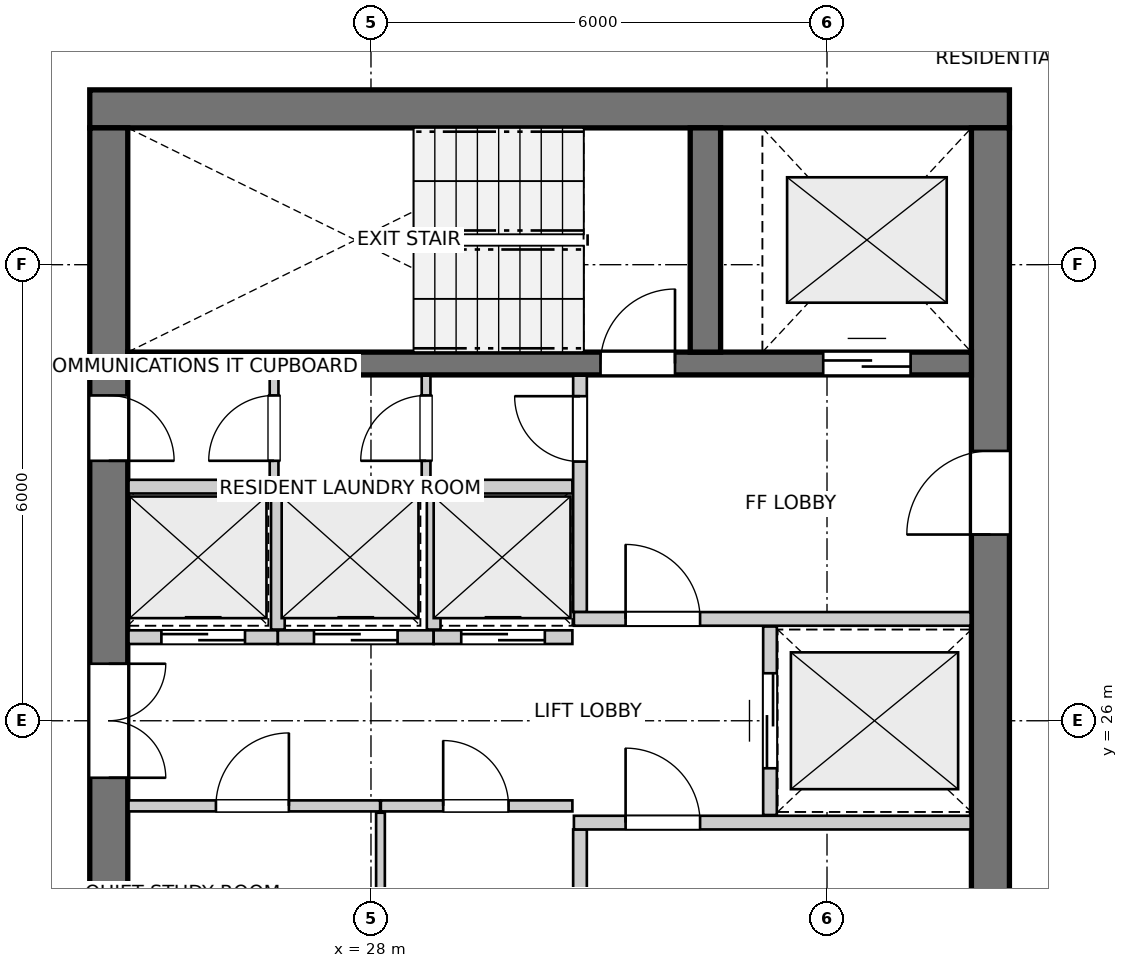
"""IFC4 building model, lengths in metres.
Left out: names, types, materials, properties, quantities, classifications, styles, units other than length and angle.
Written with IfcOpenShell. Run it as: python <this file> out.ifc"""

import sys

from ifc_helpers import new_model, si_unit, direction, frame, frame_2d, origin, place, context, subcontext, project, spatial, rectangle, extrude, source, transform, mapped, element, fill, save


model = new_model("IFC4")
c1 = context("Model", 3, precision=1e-05, world=origin(), true_north=direction((0.0, 1.0)))
c2 = subcontext(c1, "Body", "Model", "MODEL_VIEW")
j1 = project(units=[si_unit("LENGTHUNIT", "METRE"), si_unit("PLANEANGLEUNIT", "RADIAN")], contexts=[c1])
p1 = place(None, origin())
s1 = spatial("IfcSite", under=j1, at=p1, CompositionType="ELEMENT")
p2 = place(p1, origin())
s2 = spatial("IfcBuilding", under=s1, at=p2, CompositionType="ELEMENT")
p3 = place(p2, frame((0.0, 0.0, 243.6)))
s3 = spatial("IfcBuildingStorey", under=s2, at=p3, CompositionType="ELEMENT", Elevation=243.6)
p4 = place(p3, frame((36.4, 34.05, 0.0), z_axis=(0.0, 0.0, 1.0), x_axis=(-1.0, 0.0, 0.0)))
e1 = element("IfcWall", 1, at=p4, inside=s3, PredefinedType="SHEAR", context=c2, shape_type="SweptSolid", body=[
    extrude(rectangle(XDim=12.1, YDim=0.5, at=frame_2d((6.05, 0.0))), origin(), (0.0, 0.0, 1.0), 2.96),
])
p5 = place(p3, frame((24.55, 33.8, 0.0), z_axis=(0.0, 0.0, 1.0), x_axis=(0.0, -1.0, 0.0)))
e2 = element("IfcWall", 2, at=p5, inside=s3, PredefinedType="SHEAR", context=c2, shape_type="SweptSolid", body=[
    extrude(rectangle(XDim=15.6, YDim=0.5, at=frame_2d((7.8, 0.0))), origin(), (0.0, 0.0, 1.0), 2.96),
])
p6 = place(p5, frame((7.05, 0.0, 0.0)))
e3 = element("IfcOpeningElement", 3, at=p6, cuts=e2, PredefinedType="OPENING", context=c2, shape_type="SweptSolid", body=[
    extrude(rectangle(XDim=1.5, YDim=2.15, at=frame_2d((0.75, 1.075))), frame((0.0, 0.26, 0.0), z_axis=(0.0, -1.0, 0.0), x_axis=(1.0, 0.0, 0.0)), (0.0, 0.0, 1.0), 0.52),
])
p7 = place(p5, frame((3.52, 0.0, 0.0)))
e4 = element("IfcOpeningElement", 4, at=p7, cuts=e2, PredefinedType="OPENING", context=c2, shape_type="SweptSolid", body=[
    extrude(rectangle(XDim=0.86, YDim=2.05, at=frame_2d((0.43, 1.025))), frame((0.0, 0.26, 0.0), z_axis=(0.0, -1.0, 0.0), x_axis=(1.0, 0.0, 0.0)), (0.0, 0.0, 1.0), 0.52),
])
p8 = place(p5, frame((11.22, 0.0, 0.0)))
e5 = element("IfcOpeningElement", 5, at=p8, cuts=e2, PredefinedType="OPENING", context=c2, shape_type="SweptSolid", body=[
    extrude(rectangle(XDim=0.86, YDim=2.05, at=frame_2d((0.43, 1.025))), frame((0.0, 0.26, 0.0), z_axis=(0.0, -1.0, 0.0), x_axis=(1.0, 0.0, 0.0)), (0.0, 0.0, 1.0), 0.52),
])
p9 = place(p3, frame((36.15, 18.2, 0.0), z_axis=(0.0, 0.0, 1.0), x_axis=(0.0, 1.0, 0.0)))
e6 = element("IfcWall", 6, at=p9, inside=s3, PredefinedType="SHEAR", context=c2, shape_type="SweptSolid", body=[
    extrude(rectangle(XDim=15.6, YDim=0.5, at=frame_2d((7.8, 0.0))), origin(), (0.0, 0.0, 1.0), 2.96),
])
p10 = place(p9, frame((4.25, 0.0, 0.0)))
e7 = element("IfcOpeningElement", 7, at=p10, cuts=e6, PredefinedType="OPENING", context=c2, shape_type="SweptSolid", body=[
    extrude(rectangle(XDim=1.1, YDim=2.15, at=frame_2d((0.55, 1.075))), frame((0.0, 0.26, 0.0), z_axis=(0.0, -1.0, 0.0), x_axis=(1.0, 0.0, 0.0)), (0.0, 0.0, 1.0), 0.52),
])
p11 = place(p9, frame((10.25, 0.0, 0.0)))
e8 = element("IfcOpeningElement", 8, at=p11, cuts=e6, PredefinedType="OPENING", context=c2, shape_type="SweptSolid", body=[
    extrude(rectangle(XDim=1.1, YDim=2.15, at=frame_2d((0.55, 1.075))), frame((0.0, 0.26, 0.0), z_axis=(0.0, -1.0, 0.0), x_axis=(1.0, 0.0, 0.0)), (0.0, 0.0, 1.0), 0.52),
])
p12 = place(p3, frame((24.8, 30.7, 0.0), z_axis=(0.0, 0.0, 1.0), x_axis=(1.0, 0.0, 0.0)))
e9 = element("IfcWall", 9, at=p12, inside=s3, PredefinedType="SHEAR", context=c2, shape_type="SweptSolid", body=[
    extrude(rectangle(XDim=11.1, YDim=0.3, at=frame_2d((5.55, 0.0))), origin(), (0.0, 0.0, 1.0), 2.96),
])
p13 = place(p12, frame((6.22, 0.0, 0.0)))
e10 = element("IfcOpeningElement", 10, at=p13, cuts=e9, PredefinedType="OPENING", context=c2, shape_type="SweptSolid", body=[
    extrude(rectangle(XDim=0.98, YDim=2.15, at=frame_2d((0.49, 1.075))), frame((0.0, 0.16, 0.0), z_axis=(0.0, -1.0, 0.0), x_axis=(1.0, 0.0, 0.0)), (0.0, 0.0, 1.0), 0.32),
])
p14 = place(p12, frame((9.15, 0.0, 0.0)))
e11 = element("IfcOpeningElement", 11, at=p14, cuts=e9, PredefinedType="OPENING", context=c2, shape_type="SweptSolid", body=[
    extrude(rectangle(XDim=1.15, YDim=2.15, at=frame_2d((0.575, 1.075))), frame((0.0, 0.16, 0.0), z_axis=(0.0, -1.0, 0.0), x_axis=(1.0, 0.0, 0.0)), (0.0, 0.0, 1.0), 0.32),
])
p15 = place(p3, frame((32.4, 30.85, 0.0), z_axis=(0.0, 0.0, 1.0), x_axis=(0.0, 1.0, 0.0)))
e12 = element("IfcWall", 12, at=p15, inside=s3, PredefinedType="SHEAR", context=c2, shape_type="SweptSolid", body=[
    extrude(rectangle(XDim=2.95, YDim=0.4, at=frame_2d((1.475, 0.0))), origin(), (0.0, 0.0, 1.0), 2.96),
])
p16 = place(p3, frame((30.75, 21.46, 0.0), z_axis=(0.0, 0.0, 1.0), x_axis=(0.0, 1.0, 0.0)))
e13 = element("IfcWall", 13, at=p16, inside=s3, PredefinedType="PARTITIONING", context=c2, shape_type="SweptSolid", body=[
    extrude(rectangle(XDim=3.11, YDim=0.18, at=frame_2d((1.555, 0.0))), origin(), (0.0, 0.0, 1.0), 2.96),
])
p17 = place(p16, frame((0.26, 0.0, 0.0)))
e14 = element("IfcOpeningElement", 14, at=p17, cuts=e13, PredefinedType="OPENING", context=c2, shape_type="SweptSolid", body=[
    extrude(rectangle(XDim=0.86, YDim=2.05, at=frame_2d((0.43, 1.025))), frame((0.0, 0.1, 0.0), z_axis=(0.0, -1.0, 0.0), x_axis=(1.0, 0.0, 0.0)), (0.0, 0.0, 1.0), 0.2),
])
p18 = place(p3, frame((30.67, 24.66, 0.0), z_axis=(0.0, 0.0, 1.0), x_axis=(1.0, 0.0, 0.0)))
e15 = element("IfcWall", 15, at=p18, inside=s3, PredefinedType="PARTITIONING", context=c2, shape_type="SweptSolid", body=[
    extrude(rectangle(XDim=5.22, YDim=0.18, at=frame_2d((2.61, 0.0))), origin(), (0.0, 0.0, 1.0), 2.96),
])
p19 = place(p18, frame((0.68, 0.0, 0.0)))
e16 = element("IfcOpeningElement", 16, at=p19, cuts=e15, PredefinedType="OPENING", context=c2, shape_type="SweptSolid", body=[
    extrude(rectangle(XDim=0.98, YDim=2.15, at=frame_2d((0.49, 1.075))), frame((0.0, 0.1, 0.0), z_axis=(0.0, -1.0, 0.0), x_axis=(1.0, 0.0, 0.0)), (0.0, 0.0, 1.0), 0.2),
])
p20 = place(p3, frame((30.75, 27.43, 0.0), z_axis=(0.0, 0.0, 1.0), x_axis=(0.0, 1.0, 0.0)))
e17 = element("IfcWall", 17, at=p20, inside=s3, PredefinedType="PARTITIONING", context=c2, shape_type="SweptSolid", body=[
    extrude(rectangle(XDim=3.11, YDim=0.18, at=frame_2d((1.555, 0.0))), origin(), (0.0, 0.0, 1.0), 2.96),
])
p21 = place(p20, frame((1.98, 0.0, 0.0)))
e18 = element("IfcOpeningElement", 18, at=p21, cuts=e17, PredefinedType="OPENING", context=c2, shape_type="SweptSolid", body=[
    extrude(rectangle(XDim=0.86, YDim=2.05, at=frame_2d((0.43, 1.025))), frame((0.0, 0.1, 0.0), z_axis=(0.0, -1.0, 0.0), x_axis=(1.0, 0.0, 0.0)), (0.0, 0.0, 1.0), 0.2),
])
p22 = place(p3, frame((30.67, 27.34, 0.0), z_axis=(0.0, 0.0, 1.0), x_axis=(1.0, 0.0, 0.0)))
e19 = element("IfcWall", 19, at=p22, inside=s3, PredefinedType="PARTITIONING", context=c2, shape_type="SweptSolid", body=[
    extrude(rectangle(XDim=5.22, YDim=0.18, at=frame_2d((2.61, 0.0))), origin(), (0.0, 0.0, 1.0), 2.96),
])
p23 = place(p22, frame((0.68, 0.0, 0.0)))
e20 = element("IfcOpeningElement", 20, at=p23, cuts=e19, PredefinedType="OPENING", context=c2, shape_type="SweptSolid", body=[
    extrude(rectangle(XDim=0.98, YDim=2.15, at=frame_2d((0.49, 1.075))), frame((0.0, 0.1, 0.0), z_axis=(0.0, -1.0, 0.0), x_axis=(1.0, 0.0, 0.0)), (0.0, 0.0, 1.0), 0.2),
])
p24 = place(p3, frame((33.25, 24.76, 0.0), z_axis=(0.0, 0.0, 1.0), x_axis=(0.0, 1.0, 0.0)))
e21 = element("IfcWall", 21, at=p24, inside=s3, PredefinedType="PARTITIONING", context=c2, shape_type="SweptSolid", body=[
    extrude(rectangle(XDim=2.48, YDim=0.18, at=frame_2d((1.24, 0.0))), origin(), (0.0, 0.0, 1.0), 2.96),
])
p25 = place(p24, frame((0.615, 0.0, 0.0)))
e22 = element("IfcOpeningElement", 22, at=p25, cuts=e21, PredefinedType="OPENING", context=c2, shape_type="SweptSolid", body=[
    extrude(rectangle(XDim=1.25, YDim=2.15, at=frame_2d((0.625, 1.075))), frame((0.0, 0.1, 0.0), z_axis=(0.0, -1.0, 0.0), x_axis=(1.0, 0.0, 0.0)), (0.0, 0.0, 1.0), 0.2),
])
p26 = place(p3, frame((24.81, 24.88, 0.0), z_axis=(0.0, 0.0, 1.0), x_axis=(1.0, 0.0, 0.0)))
e23 = element("IfcWall", 23, at=p26, inside=s3, PredefinedType="PARTITIONING", context=c2, shape_type="SweptSolid", body=[
    extrude(rectangle(XDim=3.31, YDim=0.145, at=frame_2d((1.655, 0.0))), origin(), (0.0, 0.0, 1.0), 2.96),
])
p27 = place(p26, frame((1.15, 0.0, 0.0)))
e24 = element("IfcOpeningElement", 24, at=p27, cuts=e23, PredefinedType="OPENING", context=c2, shape_type="SweptSolid", body=[
    extrude(rectangle(XDim=0.96, YDim=2.1, at=frame_2d((0.48, 1.05))), frame((0.0, 0.083, 0.0), z_axis=(0.0, -1.0, 0.0), x_axis=(1.0, 0.0, 0.0)), (0.0, 0.0, 1.0), 0.165),
])
p28 = place(p3, frame((28.13, 24.88, 0.0), z_axis=(0.0, 0.0, 1.0), x_axis=(1.0, 0.0, 0.0)))
e25 = element("IfcWall", 25, at=p28, inside=s3, PredefinedType="PARTITIONING", context=c2, shape_type="SweptSolid", body=[
    extrude(rectangle(XDim=2.52, YDim=0.145, at=frame_2d((1.26, 0.0))), origin(), (0.0, 0.0, 1.0), 2.96),
])
p29 = place(p28, frame((0.82, 0.0, 0.0)))
e26 = element("IfcOpeningElement", 26, at=p29, cuts=e25, PredefinedType="OPENING", context=c2, shape_type="SweptSolid", body=[
    extrude(rectangle(XDim=0.86, YDim=2.05, at=frame_2d((0.43, 1.025))), frame((0.0, 0.083, 0.0), z_axis=(0.0, -1.0, 0.0), x_axis=(1.0, 0.0, 0.0)), (0.0, 0.0, 1.0), 0.165),
])
p30 = place(p3, frame((28.125, 23.02, 0.0), z_axis=(0.0, 0.0, 1.0), x_axis=(0.0, 1.0, 0.0)))
e27 = element("IfcWall", 27, at=p30, inside=s3, PredefinedType="PARTITIONING", context=c2, shape_type="SweptSolid", body=[
    extrude(rectangle(XDim=1.77, YDim=0.115, at=frame_2d((0.885, 0.0))), origin(), (0.0, 0.0, 1.0), 2.96),
])
p31 = place(p3, frame((24.81, 29.08, 0.0), z_axis=(0.0, 0.0, 1.0), x_axis=(1.0, 0.0, 0.0)))
e28 = element("IfcWall", 28, at=p31, inside=s3, PredefinedType="PARTITIONING", context=c2, shape_type="SweptSolid", body=[
    extrude(rectangle(XDim=5.84, YDim=0.18, at=frame_2d((2.92, 0.0))), origin(), (0.0, 0.0, 1.0), 2.96),
])
p32 = place(p3, frame((24.81, 27.1, 0.0), z_axis=(0.0, 0.0, 1.0), x_axis=(1.0, 0.0, 0.0)))
e29 = element("IfcWall", 29, at=p32, inside=s3, PredefinedType="PARTITIONING", context=c2, shape_type="SweptSolid", body=[
    extrude(rectangle(XDim=1.965, YDim=0.18, at=frame_2d((0.982, 0.0))), origin(), (0.0, 0.0, 1.0), 2.96),
])
p33 = place(p32, frame((0.433, 0.0, 0.0)))
e30 = element("IfcOpeningElement", 30, at=p33, cuts=e29, PredefinedType="OPENING", context=c2, shape_type="SweptSolid", body=[
    extrude(rectangle(XDim=1.1, YDim=2.15, at=frame_2d((0.55, 1.075))), frame((0.0, 0.1, 0.0), z_axis=(0.0, -1.0, 0.0), x_axis=(1.0, 0.0, 0.0)), (0.0, 0.0, 1.0), 0.2),
])
p34 = place(p3, frame((26.775, 27.1, 0.0), z_axis=(0.0, 0.0, 1.0), x_axis=(1.0, 0.0, 0.0)))
e31 = element("IfcWall", 31, at=p34, inside=s3, PredefinedType="PARTITIONING", context=c2, shape_type="SweptSolid", body=[
    extrude(rectangle(XDim=2.05, YDim=0.18, at=frame_2d((1.025, 0.0))), origin(), (0.0, 0.0, 1.0), 2.96),
])
p35 = place(p34, frame((0.475, 0.0, 0.0)))
e32 = element("IfcOpeningElement", 32, at=p35, cuts=e31, PredefinedType="OPENING", context=c2, shape_type="SweptSolid", body=[
    extrude(rectangle(XDim=1.1, YDim=2.15, at=frame_2d((0.55, 1.075))), frame((0.0, 0.1, 0.0), z_axis=(0.0, -1.0, 0.0), x_axis=(1.0, 0.0, 0.0)), (0.0, 0.0, 1.0), 0.2),
])
p36 = place(p3, frame((26.775, 27.2, 0.0), z_axis=(0.0, 0.0, 1.0), x_axis=(0.0, 1.0, 0.0)))
e33 = element("IfcWall", 33, at=p36, inside=s3, PredefinedType="PARTITIONING", context=c2, shape_type="SweptSolid", body=[
    extrude(rectangle(XDim=1.78, YDim=0.18, at=frame_2d((0.89, 0.0))), origin(), (0.0, 0.0, 1.0), 2.96),
])
p37 = place(p3, frame((28.825, 27.1, 0.0), z_axis=(0.0, 0.0, 1.0), x_axis=(1.0, 0.0, 0.0)))
e34 = element("IfcWall", 34, at=p37, inside=s3, PredefinedType="PARTITIONING", context=c2, shape_type="SweptSolid", body=[
    extrude(rectangle(XDim=1.825, YDim=0.18, at=frame_2d((0.913, 0.0))), origin(), (0.0, 0.0, 1.0), 2.96),
])
p38 = place(p37, frame((0.363, 0.0, 0.0)))
e35 = element("IfcOpeningElement", 35, at=p38, cuts=e34, PredefinedType="OPENING", context=c2, shape_type="SweptSolid", body=[
    extrude(rectangle(XDim=1.1, YDim=2.15, at=frame_2d((0.55, 1.075))), frame((0.0, 0.1, 0.0), z_axis=(0.0, -1.0, 0.0), x_axis=(1.0, 0.0, 0.0)), (0.0, 0.0, 1.0), 0.2),
])
p39 = place(p3, frame((28.825, 27.2, 0.0), z_axis=(0.0, 0.0, 1.0), x_axis=(0.0, 1.0, 0.0)))
e36 = element("IfcWall", 36, at=p39, inside=s3, PredefinedType="PARTITIONING", context=c2, shape_type="SweptSolid", body=[
    extrude(rectangle(XDim=1.78, YDim=0.18, at=frame_2d((0.89, 0.0))), origin(), (0.0, 0.0, 1.0), 2.96),
])
p40 = place(p3, frame((26.725, 29.16, 0.0), z_axis=(0.0, 0.0, 1.0), x_axis=(0.0, 1.0, 0.0)))
e37 = element("IfcWall", 37, at=p40, inside=s3, PredefinedType="PARTITIONING", context=c2, shape_type="SweptSolid", body=[
    extrude(rectangle(XDim=1.38, YDim=0.115, at=frame_2d((0.69, 0.0))), origin(), (0.0, 0.0, 1.0), 2.96),
])
p41 = place(p40, frame((0.26, 0.0, 0.0)))
e38 = element("IfcOpeningElement", 38, at=p41, cuts=e37, PredefinedType="OPENING", context=c2, shape_type="SweptSolid", body=[
    extrude(rectangle(XDim=0.86, YDim=2.05, at=frame_2d((0.43, 1.025))), frame((0.0, 0.067, 0.0), z_axis=(0.0, -1.0, 0.0), x_axis=(1.0, 0.0, 0.0)), (0.0, 0.0, 1.0), 0.135),
])
p42 = place(p3, frame((28.725, 29.16, 0.0), z_axis=(0.0, 0.0, 1.0), x_axis=(0.0, 1.0, 0.0)))
e39 = element("IfcWall", 39, at=p42, inside=s3, PredefinedType="PARTITIONING", context=c2, shape_type="SweptSolid", body=[
    extrude(rectangle(XDim=1.38, YDim=0.115, at=frame_2d((0.69, 0.0))), origin(), (0.0, 0.0, 1.0), 2.96),
])
p43 = place(p42, frame((0.26, 0.0, 0.0)))
e40 = element("IfcOpeningElement", 40, at=p43, cuts=e39, PredefinedType="OPENING", context=c2, shape_type="SweptSolid", body=[
    extrude(rectangle(XDim=0.86, YDim=2.05, at=frame_2d((0.43, 1.025))), frame((0.0, 0.067, 0.0), z_axis=(0.0, -1.0, 0.0), x_axis=(1.0, 0.0, 0.0)), (0.0, 0.0, 1.0), 0.135),
])
m1 = source(origin(), c2, "Body", "SweptSolid", [
    extrude(rectangle(XDim=0.98, YDim=2.15, at=frame_2d((0.49, 1.075))), frame((0.0, 0.025, 0.0), z_axis=(0.0, -1.0, 0.0), x_axis=(1.0, 0.0, 0.0)), (0.0, 0.0, 1.0), 0.05),
])
p44 = place(p13, origin())
e41 = element("IfcDoor", 41, at=p44, inside=s3, OperationType="SINGLE_SWING_RIGHT", PredefinedType="DOOR", context=c2, shape_type="MappedRepresentation", body=[
    mapped(m1, transform((0.0, 0.0, 0.0), x_axis=(1.0, 0.0, 0.0), y_axis=(0.0, 1.0, 0.0), z_axis=(0.0, 0.0, 1.0), scale=1.0)),
])
fill(e10, e41)
m2 = source(origin(), c2, "Body", "SweptSolid", [
    extrude(rectangle(XDim=1.15, YDim=2.15, at=frame_2d((0.575, 1.075))), frame((0.0, 0.025, 0.0), z_axis=(0.0, -1.0, 0.0), x_axis=(1.0, 0.0, 0.0)), (0.0, 0.0, 1.0), 0.05),
])
p45 = place(p14, origin())
e42 = element("IfcDoor", 42, at=p45, inside=s3, OperationType="DOUBLE_DOOR_SLIDING", PredefinedType="DOOR", context=c2, shape_type="MappedRepresentation", body=[
    mapped(m2, transform((0.0, 0.0, 0.0), x_axis=(1.0, 0.0, 0.0), y_axis=(0.0, 1.0, 0.0), z_axis=(0.0, 0.0, 1.0), scale=1.0)),
])
fill(e11, e42)
m3 = source(origin(), c2, "Body", "SweptSolid", [
    extrude(rectangle(XDim=1.1, YDim=2.15, at=frame_2d((0.55, 1.075))), frame((0.0, 0.025, 0.0), z_axis=(0.0, -1.0, 0.0), x_axis=(1.0, 0.0, 0.0)), (0.0, 0.0, 1.0), 0.05),
])
p46 = place(p11, origin())
e43 = element("IfcDoor", 43, at=p46, inside=s3, OperationType="SINGLE_SWING_LEFT", PredefinedType="DOOR", context=c2, shape_type="MappedRepresentation", body=[
    mapped(m3, transform((0.0, 0.0, 0.0), x_axis=(1.0, 0.0, 0.0), y_axis=(0.0, 1.0, 0.0), z_axis=(0.0, 0.0, 1.0), scale=1.0)),
])
fill(e8, e43)
m4 = source(origin(), c2, "Body", "SweptSolid", [
    extrude(rectangle(XDim=1.5, YDim=2.15, at=frame_2d((0.75, 1.075))), frame((0.0, 0.025, 0.0), z_axis=(0.0, -1.0, 0.0), x_axis=(1.0, 0.0, 0.0)), (0.0, 0.0, 1.0), 0.05),
])
p47 = place(p6, origin())
e44 = element("IfcDoor", 44, at=p47, inside=s3, OperationType="DOUBLE_DOOR_SINGLE_SWING", PredefinedType="DOOR", context=c2, shape_type="MappedRepresentation", body=[
    mapped(m4, transform((0.0, 0.0, 0.0), x_axis=(1.0, 0.0, 0.0), y_axis=(0.0, 1.0, 0.0), z_axis=(0.0, 0.0, 1.0), scale=1.0)),
])
fill(e3, e44)
m5 = source(origin(), c2, "Body", "SweptSolid", [
    extrude(rectangle(XDim=0.86, YDim=2.05, at=frame_2d((0.43, 1.025))), frame((0.0, 0.025, 0.0), z_axis=(0.0, -1.0, 0.0), x_axis=(1.0, 0.0, 0.0)), (0.0, 0.0, 1.0), 0.05),
])
p48 = place(p7, origin())
e45 = element("IfcDoor", 45, at=p48, inside=s3, OperationType="SINGLE_SWING_RIGHT", PredefinedType="DOOR", context=c2, shape_type="MappedRepresentation", body=[
    mapped(m5, transform((0.0, 0.0, 0.0), x_axis=(1.0, 0.0, 0.0), y_axis=(0.0, 1.0, 0.0), z_axis=(0.0, 0.0, 1.0), scale=1.0)),
])
fill(e4, e45)
p49 = place(p19, origin())
e46 = element("IfcDoor", 46, at=p49, inside=s3, OperationType="SINGLE_SWING_LEFT", PredefinedType="DOOR", context=c2, shape_type="MappedRepresentation", body=[
    mapped(m1, transform((0.0, 0.0, 0.0), x_axis=(1.0, 0.0, 0.0), y_axis=(0.0, 1.0, 0.0), z_axis=(0.0, 0.0, 1.0), scale=1.0)),
])
fill(e16, e46)
p50 = place(p21, origin())
e47 = element("IfcDoor", 47, at=p50, inside=s3, OperationType="SINGLE_SWING_RIGHT", PredefinedType="DOOR", context=c2, shape_type="MappedRepresentation", body=[
    mapped(m5, transform((0.0, 0.0, 0.0), x_axis=(1.0, 0.0, 0.0), y_axis=(0.0, 1.0, 0.0), z_axis=(0.0, 0.0, 1.0), scale=1.0)),
])
fill(e18, e47)
p51 = place(p23, origin())
e48 = element("IfcDoor", 48, at=p51, inside=s3, OperationType="SINGLE_SWING_LEFT", PredefinedType="DOOR", context=c2, shape_type="MappedRepresentation", body=[
    mapped(m1, transform((0.0, 0.0, 0.0), x_axis=(1.0, 0.0, 0.0), y_axis=(0.0, 1.0, 0.0), z_axis=(0.0, 0.0, 1.0), scale=1.0)),
])
fill(e20, e48)
m6 = source(origin(), c2, "Body", "SweptSolid", [
    extrude(rectangle(XDim=1.25, YDim=2.15, at=frame_2d((0.625, 1.075))), frame((0.0, 0.025, 0.0), z_axis=(0.0, -1.0, 0.0), x_axis=(1.0, 0.0, 0.0)), (0.0, 0.0, 1.0), 0.05),
])
p52 = place(p25, origin())
e49 = element("IfcDoor", 49, at=p52, inside=s3, OperationType="DOUBLE_DOOR_SLIDING", PredefinedType="DOOR", context=c2, shape_type="MappedRepresentation", body=[
    mapped(m6, transform((0.0, 0.0, 0.0), x_axis=(1.0, 0.0, 0.0), y_axis=(0.0, 1.0, 0.0), z_axis=(0.0, 0.0, 1.0), scale=1.0)),
])
fill(e22, e49)
m7 = source(origin(), c2, "Body", "SweptSolid", [
    extrude(rectangle(XDim=0.96, YDim=2.1, at=frame_2d((0.48, 1.05))), frame((0.0, 0.025, 0.0), z_axis=(0.0, -1.0, 0.0), x_axis=(1.0, 0.0, 0.0)), (0.0, 0.0, 1.0), 0.05),
])
p53 = place(p27, origin())
e50 = element("IfcDoor", 50, at=p53, inside=s3, OperationType="SINGLE_SWING_RIGHT", PredefinedType="DOOR", context=c2, shape_type="MappedRepresentation", body=[
    mapped(m7, transform((0.0, 0.0, 0.0), x_axis=(1.0, 0.0, 0.0), y_axis=(0.0, 1.0, 0.0), z_axis=(0.0, 0.0, 1.0), scale=1.0)),
])
fill(e24, e50)
p54 = place(p29, origin())
e51 = element("IfcDoor", 51, at=p54, inside=s3, OperationType="SINGLE_SWING_LEFT", PredefinedType="DOOR", context=c2, shape_type="MappedRepresentation", body=[
    mapped(m5, transform((0.0, 0.0, 0.0), x_axis=(1.0, 0.0, 0.0), y_axis=(0.0, 1.0, 0.0), z_axis=(0.0, 0.0, 1.0), scale=1.0)),
])
fill(e26, e51)
p55 = place(p33, origin())
e52 = element("IfcDoor", 52, at=p55, inside=s3, OperationType="DOUBLE_DOOR_SLIDING", PredefinedType="DOOR", context=c2, shape_type="MappedRepresentation", body=[
    mapped(m3, transform((0.0, 0.0, 0.0), x_axis=(1.0, 0.0, 0.0), y_axis=(0.0, 1.0, 0.0), z_axis=(0.0, 0.0, 1.0), scale=1.0)),
])
fill(e30, e52)
p56 = place(p35, origin())
e53 = element("IfcDoor", 53, at=p56, inside=s3, OperationType="DOUBLE_DOOR_SLIDING", PredefinedType="DOOR", context=c2, shape_type="MappedRepresentation", body=[
    mapped(m3, transform((0.0, 0.0, 0.0), x_axis=(1.0, 0.0, 0.0), y_axis=(0.0, 1.0, 0.0), z_axis=(0.0, 0.0, 1.0), scale=1.0)),
])
fill(e32, e53)
p57 = place(p38, origin())
e54 = element("IfcDoor", 54, at=p57, inside=s3, OperationType="DOUBLE_DOOR_SLIDING", PredefinedType="DOOR", context=c2, shape_type="MappedRepresentation", body=[
    mapped(m3, transform((0.0, 0.0, 0.0), x_axis=(1.0, 0.0, 0.0), y_axis=(0.0, 1.0, 0.0), z_axis=(0.0, 0.0, 1.0), scale=1.0)),
])
fill(e35, e54)
p58 = place(p41, origin())
e55 = element("IfcDoor", 55, at=p58, inside=s3, OperationType="SINGLE_SWING_LEFT", PredefinedType="DOOR", context=c2, shape_type="MappedRepresentation", body=[
    mapped(m5, transform((0.0, 0.0, 0.0), x_axis=(1.0, 0.0, 0.0), y_axis=(0.0, 1.0, 0.0), z_axis=(0.0, 0.0, 1.0), scale=1.0)),
])
fill(e38, e55)
p59 = place(p43, origin())
e56 = element("IfcDoor", 56, at=p59, inside=s3, OperationType="SINGLE_SWING_LEFT", PredefinedType="DOOR", context=c2, shape_type="MappedRepresentation", body=[
    mapped(m5, transform((0.0, 0.0, 0.0), x_axis=(1.0, 0.0, 0.0), y_axis=(0.0, 1.0, 0.0), z_axis=(0.0, 0.0, 1.0), scale=1.0)),
])
fill(e40, e56)
save(model, sys.argv[1])
